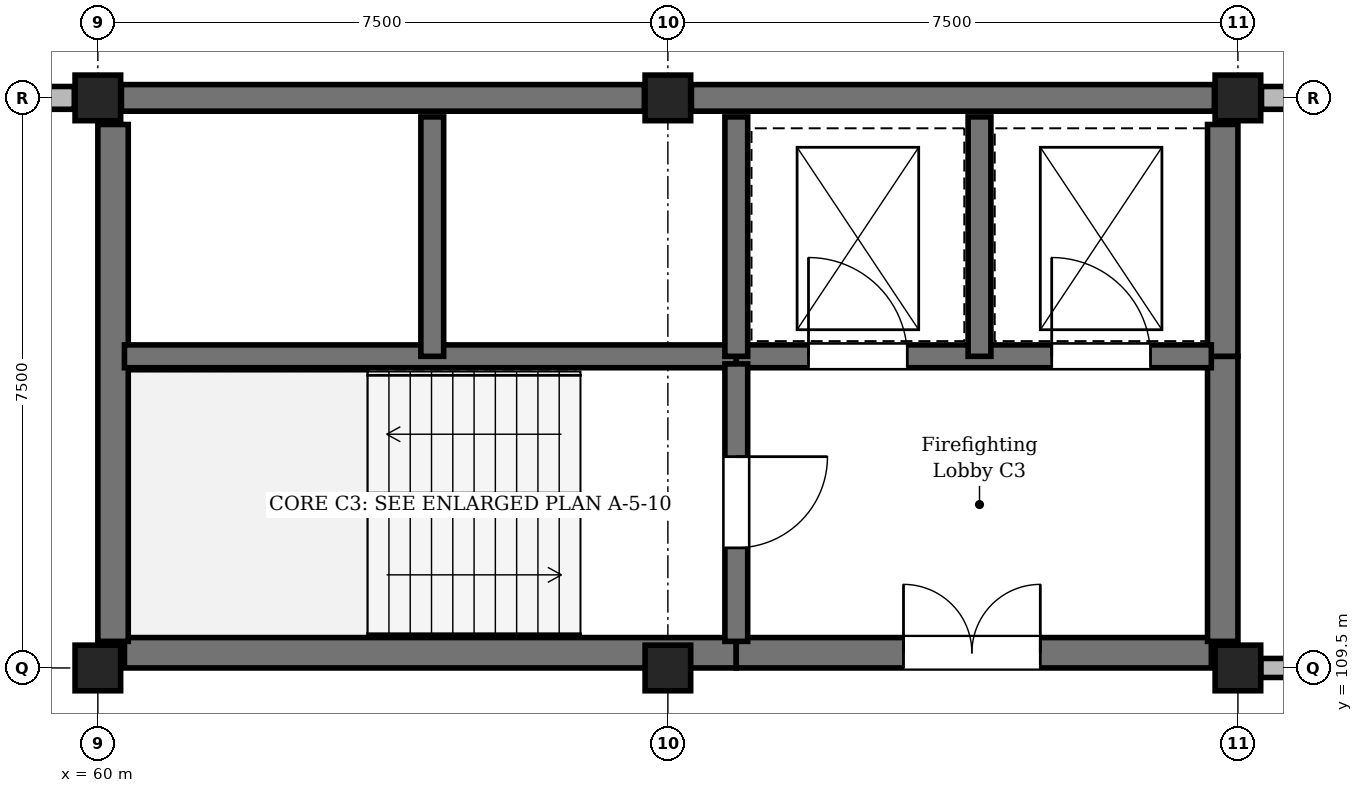
"""IFC4 building model, lengths in metres.
Left out: names, types, materials, properties, quantities, classifications, styles, units other than length and angle.
Written with IfcOpenShell. Run it as: python <this file> out.ifc"""

import sys

from ifc_helpers import new_model, si_unit, direction, frame, frame_2d, origin, origin_2d, place, context, subcontext, project, spatial, rectangle, circle, extrude, element, fill, save


model = new_model("IFC4")
c1 = context("Model", 3, precision=1e-05, world=origin(), true_north=direction((0.0, 1.0)))
c2 = subcontext(c1, "Body", "Model", "MODEL_VIEW")
j1 = project(units=[si_unit("LENGTHUNIT", "METRE"), si_unit("PLANEANGLEUNIT", "RADIAN")], contexts=[c1])
p1 = place(None, origin())
s1 = spatial("IfcSite", under=j1, at=p1, CompositionType="ELEMENT")
p2 = place(p1, origin())
s2 = spatial("IfcBuilding", under=s1, at=p2, CompositionType="ELEMENT")
p3 = place(p2, frame((0.0, 0.0, 14.1)))
s3 = spatial("IfcBuildingStorey", under=s2, at=p3, CompositionType="ELEMENT", Elevation=14.1)
for number, where, z_axis, x_axis in (
    (1, (60.0, 109.5, 0.0), (0.0, 0.0, 1.0), (1.0, 0.0, 0.0)),
    (2, (60.0, 117.0, 0.0), (0.0, 0.0, 1.0), (1.0, 0.0, 0.0)),
    (3, (67.5, 109.5, 0.0), (0.0, 0.0, 1.0), (1.0, 0.0, 0.0)),
):
    element("IfcColumn", number, at=place(p3, frame(where, z_axis=z_axis, x_axis=x_axis)), inside=s3, PredefinedType="COLUMN", context=c2, shape_type="SweptSolid", body=[
        extrude(rectangle(XDim=0.6, YDim=0.6, at=origin_2d()), origin(), (0.0, 0.0, 1.0), 3.75),
    ])
for number, where, z_axis, x_axis in (
    (4, (67.5, 117.0, 0.0), (0.0, 0.0, 1.0), (1.0, 0.0, 0.0)),
    (5, (75.0, 109.5, 0.0), (0.0, 0.0, 1.0), (1.0, 0.0, 0.0)),
):
    element("IfcColumn", number, at=place(p3, frame(where, z_axis=z_axis, x_axis=x_axis)), inside=s3, PredefinedType="COLUMN", context=c2, shape_type="SweptSolid", body=[
        extrude(circle(Radius=0.3, at=origin_2d()), origin(), (0.0, 0.0, 1.0), 3.75),
    ])
p4 = place(p3, frame((75.0, 117.0, 0.0), z_axis=(0.0, 0.0, 1.0), x_axis=(1.0, 0.0, 0.0)))
e6 = element("IfcColumn", 6, at=p4, inside=s3, PredefinedType="COLUMN", context=c2, shape_type="SweptSolid", body=[
    extrude(rectangle(XDim=0.6, YDim=0.6, at=origin_2d()), origin(), (0.0, 0.0, 1.0), 3.75),
])
p5 = place(p3, frame((52.785, 117.0, 0.0), z_axis=(0.0, 0.0, 1.0), x_axis=(1.0, 0.0, 0.0)))
e7 = element("IfcWall", 7, at=p5, inside=s3, PredefinedType="STANDARD", context=c2, shape_type="SweptSolid", body=[
    extrude(rectangle(XDim=6.905, YDim=0.3, at=frame_2d((3.453, 0.0))), origin(), (0.0, 0.0, 1.0), 2.87),
])
p6 = place(p5, frame((1.952, 0.0, 1.1)))
e8 = element("IfcOpeningElement", 8, at=p6, cuts=e7, PredefinedType="OPENING", context=c2, shape_type="SweptSolid", body=[
    extrude(rectangle(XDim=3.0, YDim=1.2, at=frame_2d((1.5, 0.6))), frame((0.0, 0.16, 0.0), z_axis=(0.0, -1.0, 0.0), x_axis=(1.0, 0.0, 0.0)), (0.0, 0.0, 1.0), 0.32),
])
for number, where, z_axis, x_axis in (
    (9, (60.31, 117.0, 0.0), (0.0, 0.0, 1.0), (1.0, 0.0, 0.0)),
    (10, (67.81, 117.0, 0.0), (0.0, 0.0, 1.0), (1.0, 0.0, 0.0)),
):
    element("IfcWall", number, at=place(p3, frame(where, z_axis=z_axis, x_axis=x_axis)), inside=s3, PredefinedType="SHEAR", context=c2, shape_type="SweptSolid", body=[
        extrude(rectangle(XDim=6.88, YDim=0.35, at=frame_2d((3.44, 0.0))), origin(), (0.0, 0.0, 1.0), 3.47),
    ])
p7 = place(p3, frame((75.31, 117.0, 0.0), z_axis=(0.0, 0.0, 1.0), x_axis=(1.0, 0.0, 0.0)))
e11 = element("IfcWall", 11, at=p7, inside=s3, PredefinedType="STANDARD", context=c2, shape_type="SweptSolid", body=[
    extrude(rectangle(XDim=6.88, YDim=0.3, at=frame_2d((3.44, 0.0))), origin(), (0.0, 0.0, 1.0), 2.87),
])
p8 = place(p7, frame((2.24, 0.0, 1.1)))
e12 = element("IfcOpeningElement", 12, at=p8, cuts=e11, PredefinedType="OPENING", context=c2, shape_type="SweptSolid", body=[
    extrude(rectangle(XDim=2.4, YDim=1.2, at=frame_2d((1.2, 0.6))), frame((0.0, 0.16, 0.0), z_axis=(0.0, -1.0, 0.0), x_axis=(1.0, 0.0, 0.0)), (0.0, 0.0, 1.0), 0.32),
])
p9 = place(p3, frame((60.35, 109.7, 0.0), z_axis=(0.0, 0.0, 1.0), x_axis=(1.0, 0.0, 0.0)))
e13 = element("IfcWall", 13, at=p9, inside=s3, PredefinedType="SHEAR", context=c2, shape_type="SweptSolid", body=[
    extrude(rectangle(XDim=8.05, YDim=0.4, at=frame_2d((4.025, 0.0))), origin(), (0.0, 0.0, 1.0), 3.47),
])
p10 = place(p3, frame((68.4, 109.7, 0.0), z_axis=(0.0, 0.0, 1.0), x_axis=(1.0, 0.0, 0.0)))
e14 = element("IfcWall", 14, at=p10, inside=s3, PredefinedType="SHEAR", context=c2, shape_type="SweptSolid", body=[
    extrude(rectangle(XDim=6.25, YDim=0.4, at=frame_2d((3.125, 0.0))), origin(), (0.0, 0.0, 1.0), 3.47),
])
p11 = place(p10, frame((2.2, 0.0, 0.0)))
e15 = element("IfcOpeningElement", 15, at=p11, cuts=e14, PredefinedType="OPENING", context=c2, shape_type="SweptSolid", body=[
    extrude(rectangle(XDim=1.8, YDim=2.25, at=frame_2d((0.9, 1.125))), frame((0.0, 0.21, 0.0), z_axis=(0.0, -1.0, 0.0), x_axis=(1.0, 0.0, 0.0)), (0.0, 0.0, 1.0), 0.42),
])
p12 = place(p3, frame((60.2, 109.85, 0.0), z_axis=(0.0, 0.0, 1.0), x_axis=(0.0, 1.0, 0.0)))
e16 = element("IfcWall", 16, at=p12, inside=s3, PredefinedType="SHEAR", context=c2, shape_type="SweptSolid", body=[
    extrude(rectangle(XDim=6.8, YDim=0.4, at=frame_2d((3.4, 0.0))), origin(), (0.0, 0.0, 1.0), 3.47),
])
p13 = place(p3, frame((74.8, 109.85, 0.0), z_axis=(0.0, 0.0, 1.0), x_axis=(0.0, 1.0, 0.0)))
e17 = element("IfcWall", 17, at=p13, inside=s3, PredefinedType="SHEAR", context=c2, shape_type="SweptSolid", body=[
    extrude(rectangle(XDim=3.75, YDim=0.4, at=frame_2d((1.875, 0.0))), origin(), (0.0, 0.0, 1.0), 3.47),
])
p14 = place(p3, frame((74.8, 113.6, 0.0), z_axis=(0.0, 0.0, 1.0), x_axis=(0.0, 1.0, 0.0)))
e18 = element("IfcWall", 18, at=p14, inside=s3, PredefinedType="SHEAR", context=c2, shape_type="SweptSolid", body=[
    extrude(rectangle(XDim=3.05, YDim=0.4, at=frame_2d((1.525, 0.0))), origin(), (0.0, 0.0, 1.0), 3.47),
])
p15 = place(p3, frame((60.35, 113.6, 0.0), z_axis=(0.0, 0.0, 1.0), x_axis=(1.0, 0.0, 0.0)))
e19 = element("IfcWall", 19, at=p15, inside=s3, PredefinedType="SHEAR", context=c2, shape_type="SweptSolid", body=[
    extrude(rectangle(XDim=8.05, YDim=0.3, at=frame_2d((4.025, 0.0))), origin(), (0.0, 0.0, 1.0), 3.47),
])
p16 = place(p3, frame((68.4, 113.6, 0.0), z_axis=(0.0, 0.0, 1.0), x_axis=(1.0, 0.0, 0.0)))
e20 = element("IfcWall", 20, at=p16, inside=s3, PredefinedType="SHEAR", context=c2, shape_type="SweptSolid", body=[
    extrude(rectangle(XDim=6.25, YDim=0.3, at=frame_2d((3.125, 0.0))), origin(), (0.0, 0.0, 1.0), 3.47),
])
p17 = place(p16, frame((0.95, 0.0, 0.0)))
e21 = element("IfcOpeningElement", 21, at=p17, cuts=e20, PredefinedType="OPENING", context=c2, shape_type="SweptSolid", body=[
    extrude(rectangle(XDim=1.3, YDim=2.2, at=frame_2d((0.65, 1.1))), frame((0.0, 0.16, 0.0), z_axis=(0.0, -1.0, 0.0), x_axis=(1.0, 0.0, 0.0)), (0.0, 0.0, 1.0), 0.32),
])
p18 = place(p16, frame((4.15, 0.0, 0.0)))
e22 = element("IfcOpeningElement", 22, at=p18, cuts=e20, PredefinedType="OPENING", context=c2, shape_type="SweptSolid", body=[
    extrude(rectangle(XDim=1.3, YDim=2.2, at=frame_2d((0.65, 1.1))), frame((0.0, 0.16, 0.0), z_axis=(0.0, -1.0, 0.0), x_axis=(1.0, 0.0, 0.0)), (0.0, 0.0, 1.0), 0.32),
])
p19 = place(p3, frame((68.4, 113.5, 0.0), z_axis=(0.0, 0.0, 1.0), x_axis=(0.0, -1.0, 0.0)))
e23 = element("IfcWall", 23, at=p19, inside=s3, PredefinedType="SHEAR", context=c2, shape_type="SweptSolid", body=[
    extrude(rectangle(XDim=3.65, YDim=0.3, at=frame_2d((1.825, 0.0))), origin(), (0.0, 0.0, 1.0), 3.47),
])
p20 = place(p19, frame((1.22, 0.0, 0.0)))
e24 = element("IfcOpeningElement", 24, at=p20, cuts=e23, PredefinedType="OPENING", context=c2, shape_type="SweptSolid", body=[
    extrude(rectangle(XDim=1.2, YDim=2.25, at=frame_2d((0.6, 1.125))), frame((0.0, 0.16, 0.0), z_axis=(0.0, -1.0, 0.0), x_axis=(1.0, 0.0, 0.0)), (0.0, 0.0, 1.0), 0.32),
])
for number, where, z_axis, x_axis in (
    (25, (64.4, 113.6, 0.0), (0.0, 0.0, 1.0), (0.0, 1.0, 0.0)),
    (26, (68.4, 113.6, 0.0), (0.0, 0.0, 1.0), (0.0, 1.0, 0.0)),
    (27, (71.6, 113.6, 0.0), (0.0, 0.0, 1.0), (0.0, 1.0, 0.0)),
):
    element("IfcWall", number, at=place(p3, frame(where, z_axis=z_axis, x_axis=x_axis)), inside=s3, PredefinedType="SHEAR", context=c2, shape_type="SweptSolid", body=[
        extrude(rectangle(XDim=3.15, YDim=0.3, at=frame_2d((1.575, 0.0))), origin(), (0.0, 0.0, 1.0), 3.47),
    ])
p21 = place(p3, frame((75.3, 109.5, 0.0), z_axis=(0.0, 0.0, 1.0), x_axis=(1.0, 0.0, 0.0)))
e28 = element("IfcWall", 28, at=p21, inside=s3, PredefinedType="STANDARD", context=c2, shape_type="SweptSolid", body=[
    extrude(rectangle(XDim=21.9, YDim=0.25, at=frame_2d((10.95, 0.0))), origin(), (0.0, 0.0, 1.0), 2.855),
])
p22 = place(p21, frame((10.2, 0.0, 0.0)))
e29 = element("IfcOpeningElement", 29, at=p22, cuts=e28, PredefinedType="OPENING", context=c2, shape_type="SweptSolid", body=[
    extrude(rectangle(XDim=1.5, YDim=2.3, at=frame_2d((0.75, 1.15))), frame((0.0, 0.135, 0.0), z_axis=(0.0, -1.0, 0.0), x_axis=(1.0, 0.0, 0.0)), (0.0, 0.0, 1.0), 0.27),
])
p23 = place(p11, origin())
e30 = element("IfcDoor", 30, at=p23, inside=s3, OperationType="DOUBLE_DOOR_SINGLE_SWING", PredefinedType="DOOR", context=c2, shape_type="SweptSolid", body=[
    extrude(rectangle(XDim=1.8, YDim=2.25, at=frame_2d((0.9, 1.125))), frame((0.0, 0.025, 0.0), z_axis=(0.0, -1.0, 0.0), x_axis=(1.0, 0.0, 0.0)), (0.0, 0.0, 1.0), 0.05),
])
fill(e15, e30)
p24 = place(p17, origin())
e31 = element("IfcDoor", 31, at=p24, inside=s3, OperationType="DOUBLE_DOOR_SLIDING", PredefinedType="DOOR", context=c2, shape_type="SweptSolid", body=[
    extrude(rectangle(XDim=1.3, YDim=2.2, at=frame_2d((0.65, 1.1))), frame((0.0, 0.025, 0.0), z_axis=(0.0, -1.0, 0.0), x_axis=(1.0, 0.0, 0.0)), (0.0, 0.0, 1.0), 0.05),
])
fill(e21, e31)
p25 = place(p18, origin())
e32 = element("IfcDoor", 32, at=p25, inside=s3, OperationType="DOUBLE_DOOR_SLIDING", PredefinedType="DOOR", context=c2, shape_type="SweptSolid", body=[
    extrude(rectangle(XDim=1.3, YDim=2.2, at=frame_2d((0.65, 1.1))), frame((0.0, 0.025, 0.0), z_axis=(0.0, -1.0, 0.0), x_axis=(1.0, 0.0, 0.0)), (0.0, 0.0, 1.0), 0.05),
])
fill(e22, e32)
p26 = place(p20, origin())
e33 = element("IfcDoor", 33, at=p26, inside=s3, OperationType="SINGLE_SWING_LEFT", PredefinedType="DOOR", context=c2, shape_type="SweptSolid", body=[
    extrude(rectangle(XDim=1.2, YDim=2.25, at=frame_2d((0.6, 1.125))), frame((0.0, 0.025, 0.0), z_axis=(0.0, -1.0, 0.0), x_axis=(1.0, 0.0, 0.0)), (0.0, 0.0, 1.0), 0.05),
])
fill(e24, e33)
save(model, sys.argv[1])
